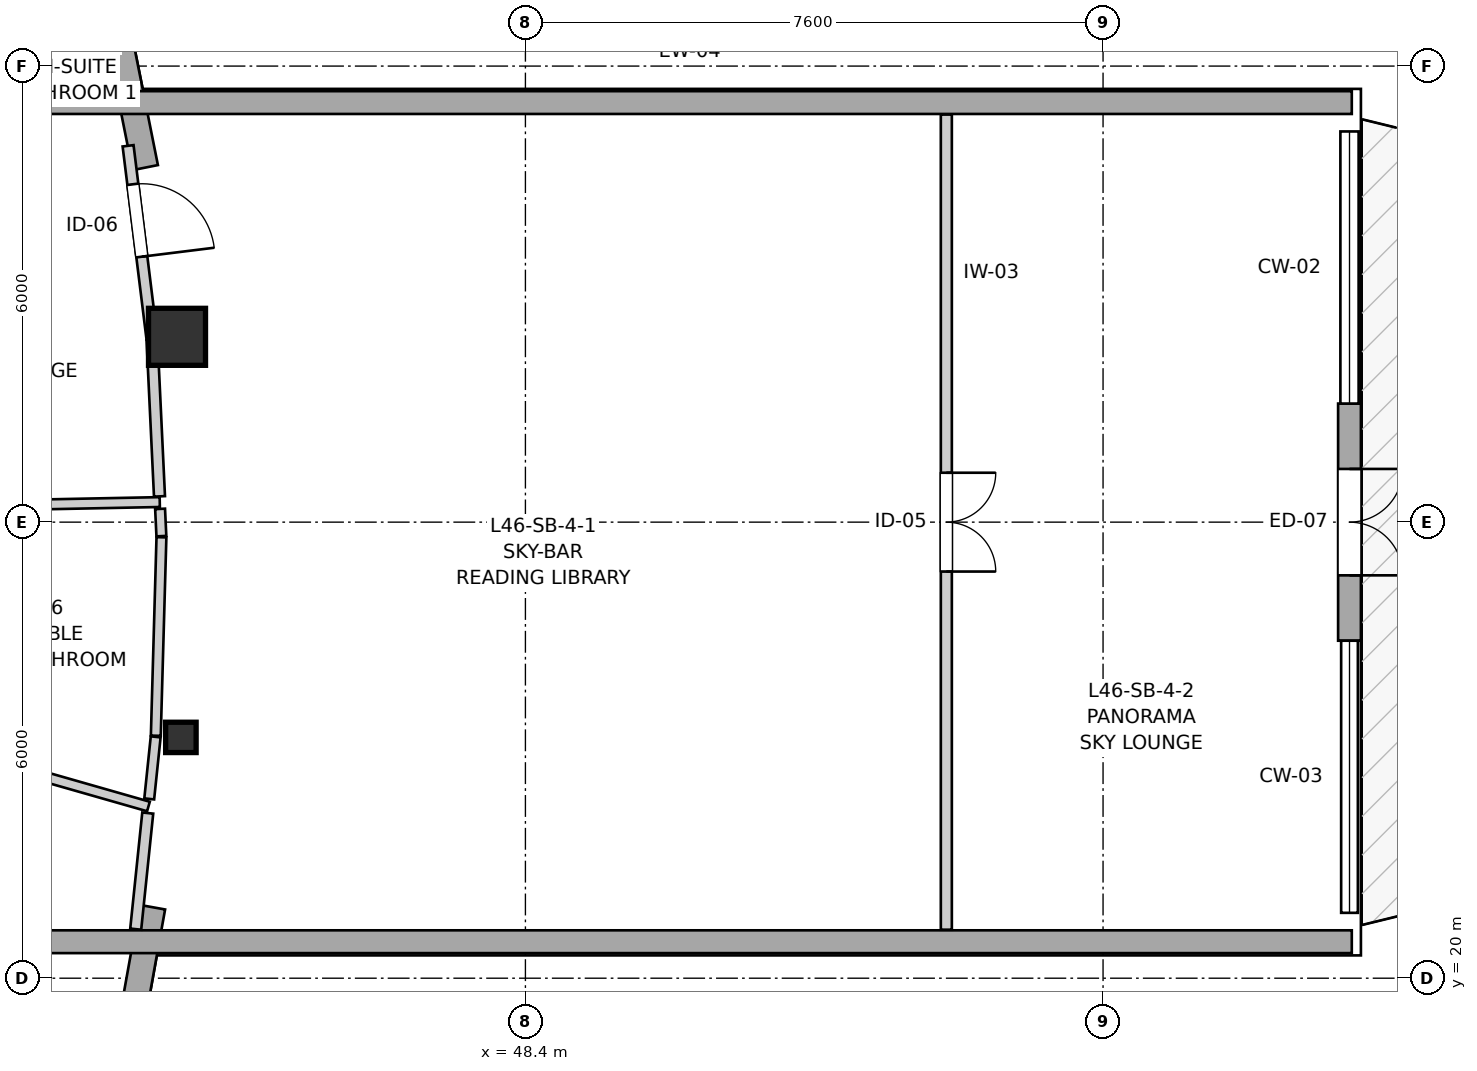
"""IFC4 building model, lengths in metres.
Left out: names, types, materials, properties, quantities, classifications, styles, units other than length and angle.
Written with IfcOpenShell. Run it as: python <this file> out.ifc"""

import sys

from ifc_helpers import new_model, si_unit, direction, frame, frame_2d, origin, origin_2d, place, context, subcontext, project, spatial, rectangle, i_section, extrude, source, transform, mapped, element, fill, save


model = new_model("IFC4")
c1 = context("Model", 3, precision=1e-05, world=origin(), true_north=direction((0.0, 1.0)))
c2 = subcontext(c1, "Body", "Model", "MODEL_VIEW")
j1 = project(units=[si_unit("LENGTHUNIT", "METRE"), si_unit("PLANEANGLEUNIT", "RADIAN")], contexts=[c1])
p1 = place(None, origin())
s1 = spatial("IfcSite", under=j1, at=p1, CompositionType="ELEMENT")
p2 = place(p1, origin())
s2 = spatial("IfcBuilding", under=s1, at=p2, CompositionType="ELEMENT")
p3 = place(p2, frame((0.0, 0.0, 155.4)))
s3 = spatial("IfcBuildingStorey", under=s2, at=p3, CompositionType="ELEMENT", Elevation=155.4)
m1 = source(origin(), c2, "Body", "SweptSolid", [
    extrude(i_section(OverallWidth=0.401, OverallDepth=0.399, WebThickness=0.023, FlangeThickness=0.036, FilletRadius=0.015, at=origin_2d()), origin(), (0.0, 0.0, 1.0), 2.935),
])
p4 = place(p3, frame((43.867, 23.168, 0.0), z_axis=(0.0, 0.0, 1.0), x_axis=(1.0, 0.0, 0.0)))
e1 = element("IfcColumn", 1, at=p4, inside=s3, PredefinedType="PILASTER", context=c2, shape_type="MappedRepresentation", body=[
    mapped(m1, transform((0.0, 0.0, 0.0), x_axis=(1.0, 0.0, 0.0), y_axis=(0.0, 1.0, 0.0), z_axis=(0.0, 0.0, 1.0), scale=1.0)),
])
m2 = source(origin(), c2, "Body", "SweptSolid", [
    extrude(rectangle(XDim=0.75, YDim=0.75, at=origin_2d()), origin(), (0.0, 0.0, 1.0), 2.935),
])
p5 = place(p3, frame((43.816, 28.438, 0.0), z_axis=(0.0, 0.0, 1.0), x_axis=(1.0, 0.0, 0.0)))
e2 = element("IfcColumn", 2, at=p5, inside=s3, PredefinedType="COLUMN", context=c2, shape_type="MappedRepresentation", body=[
    mapped(m2, transform((0.0, 0.0, 0.0), x_axis=(1.0, 0.0, 0.0), y_axis=(0.0, 1.0, 0.0), z_axis=(0.0, 0.0, 1.0), scale=1.0)),
])
p6 = place(p3, frame((42.977, 18.073, 0.0), z_axis=(0.0, 0.0, 1.0), x_axis=(0.177185533742, 0.984177467042, 0.0)))
e3 = element("IfcWall", 3, at=p6, inside=s3, PredefinedType="SOLIDWALL", context=c2, shape_type="SweptSolid", body=[
    extrude(rectangle(XDim=2.907, YDim=0.34, at=frame_2d((1.454, 0.0))), origin(), (0.0, 0.0, 1.0), 2.515),
])
p7 = place(p3, frame((43.398, 30.664, 0.0), z_axis=(0.0, 0.0, 1.0), x_axis=(-0.196147002944, 0.980574501624, 0.0)))
e4 = element("IfcWall", 4, at=p7, inside=s3, PredefinedType="SOLIDWALL", context=c2, shape_type="SweptSolid", body=[
    extrude(rectangle(XDim=3.042, YDim=0.34, at=frame_2d((1.521, 0.0))), origin(), (0.0, 0.0, 1.0), 2.515),
])
p8 = place(p7, frame((2.149, 0.0, 0.82)))
e5 = element("IfcOpeningElement", 5, at=p8, cuts=e4, PredefinedType="OPENING", context=c2, shape_type="SweptSolid", body=[
    extrude(rectangle(XDim=0.58, YDim=1.35, at=frame_2d((0.29, 0.675))), frame((0.0, 0.18, 0.0), z_axis=(0.0, -1.0, 0.0), x_axis=(1.0, 0.0, 0.0)), (0.0, 0.0, 1.0), 0.36),
])
for number, where, z_axis, x_axis in (
    (6, (41.85, 31.52, 0.0), (0.0, 0.0, 1.0), (1.0, 0.0, 0.0)),
    (7, (41.85, 20.48, 0.0), (0.0, 0.0, 1.0), (1.0, 0.0, 0.0)),
):
    element("IfcWall", number, at=place(p3, frame(where, z_axis=z_axis, x_axis=x_axis)), inside=s3, PredefinedType="SOLIDWALL", context=c2, shape_type="SweptSolid", body=[
        extrude(rectangle(XDim=17.423, YDim=0.3, at=frame_2d((8.711, 0.0))), origin(), (0.0, 0.0, 1.0), 2.115),
    ])
p9 = place(p3, frame((59.243, 27.56, 0.0), z_axis=(0.0, 0.0, 1.0), x_axis=(0.0, -1.0, 0.0)))
e8 = element("IfcWall", 8, at=p9, inside=s3, PredefinedType="SOLIDWALL", context=c2, shape_type="SweptSolid", body=[
    extrude(rectangle(XDim=3.12, YDim=0.3, at=frame_2d((1.56, 0.0))), origin(), (0.0, 0.0, 1.0), 2.3),
])
p10 = place(p9, frame((0.86, 0.0, 0.0)))
e9 = element("IfcOpeningElement", 9, at=p10, cuts=e8, PredefinedType="OPENING", context=c2, shape_type="SweptSolid", body=[
    extrude(rectangle(XDim=1.4, YDim=2.15, at=frame_2d((0.7, 1.075))), frame((0.0, 0.16, 0.0), z_axis=(0.0, -1.0, 0.0), x_axis=(1.0, 0.0, 0.0)), (0.0, 0.0, 1.0), 0.32),
])
p11 = place(p3, frame((53.938, 31.362, 0.0), z_axis=(0.0, 0.0, 1.0), x_axis=(0.0, -1.0, 0.0)))
e10 = element("IfcWall", 10, at=p11, inside=s3, PredefinedType="PARTITIONING", context=c2, shape_type="SweptSolid", body=[
    extrude(rectangle(XDim=10.724, YDim=0.145, at=frame_2d((5.362, 0.0))), origin(), (0.0, 0.0, 1.0), 2.935),
])
p12 = place(p11, frame((4.712, 0.0, 0.0)))
e11 = element("IfcOpeningElement", 11, at=p12, cuts=e10, PredefinedType="OPENING", context=c2, shape_type="SweptSolid", body=[
    extrude(rectangle(XDim=1.3, YDim=2.1, at=frame_2d((0.65, 1.05))), frame((0.0, 0.083, 0.0), z_axis=(0.0, -1.0, 0.0), x_axis=(1.0, 0.0, 0.0)), (0.0, 0.0, 1.0), 0.165),
])
p13 = place(p3, frame((43.172, 30.951, 0.0), z_axis=(0.0, 0.0, 1.0), x_axis=(0.122990311665, -0.99240787141, 0.0)))
e12 = element("IfcWall", 12, at=p13, inside=s3, PredefinedType="PARTITIONING", context=c2, shape_type="SweptSolid", body=[
    extrude(rectangle(XDim=2.561, YDim=0.145, at=frame_2d((1.28, 0.0))), origin(), (0.0, 0.0, 1.0), 2.503),
])
p14 = place(p13, frame((0.51, 0.0, 0.0)))
e13 = element("IfcOpeningElement", 13, at=p14, cuts=e12, PredefinedType="OPENING", context=c2, shape_type="SweptSolid", body=[
    extrude(rectangle(XDim=0.96, YDim=2.1, at=frame_2d((0.48, 1.05))), frame((0.0, 0.083, 0.0), z_axis=(0.0, -1.0, 0.0), x_axis=(1.0, 0.0, 0.0)), (0.0, 0.0, 1.0), 0.165),
])
p15 = place(p3, frame((38.436, 23.689, 0.0), z_axis=(0.0, 0.0, 1.0), x_axis=(0.961531027854, -0.274696345942, 0.0)))
e14 = element("IfcWall", 14, at=p15, inside=s3, PredefinedType="PARTITIONING", context=c2, shape_type="SweptSolid", body=[
    extrude(rectangle(XDim=5.205, YDim=0.13, at=frame_2d((2.602, 0.0))), origin(), (0.0, 0.0, 1.0), 2.935),
])
p16 = place(p3, frame((38.419, 26.161, 0.0), z_axis=(0.0, 0.0, 1.0), x_axis=(0.999801492135, 0.019924264719, 0.0)))
e15 = element("IfcWall", 15, at=p16, inside=s3, PredefinedType="PARTITIONING", context=c2, shape_type="SweptSolid", body=[
    extrude(rectangle(XDim=5.171, YDim=0.13, at=frame_2d((2.585, 0.0))), origin(), (0.0, 0.0, 1.0), 2.935),
])
p17 = place(p3, frame((43.537, 23.19, 0.0), z_axis=(0.0, 0.0, 1.0), x_axis=(0.028319632762, 0.999598918767, 0.0)))
e16 = element("IfcWall", 16, at=p17, inside=s3, PredefinedType="PARTITIONING", context=c2, shape_type="SweptSolid", body=[
    extrude(rectangle(XDim=2.612, YDim=0.13, at=frame_2d((1.306, 0.0))), origin(), (0.0, 0.0, 1.0), 2.503),
])
p18 = place(p3, frame((43.488, 28.395, 0.0), z_axis=(0.0, 0.0, 1.0), x_axis=(0.047441179451, -0.998874033346, 0.0)))
e17 = element("IfcWall", 17, at=p18, inside=s3, PredefinedType="PARTITIONING", context=c2, shape_type="SweptSolid", body=[
    extrude(rectangle(XDim=2.058, YDim=0.145, at=frame_2d((1.029, 0.0))), origin(), (0.0, 0.0, 1.0), 2.503),
])
p19 = place(p3, frame((43.273, 20.646, 0.0), z_axis=(0.0, 0.0, 1.0), x_axis=(0.103045636414, 0.99467662927, 0.0)))
e18 = element("IfcWall", 18, at=p19, inside=s3, PredefinedType="PARTITIONING", context=c2, shape_type="SweptSolid", body=[
    extrude(rectangle(XDim=1.535, YDim=0.145, at=frame_2d((0.768, 0.0))), origin(), (0.0, 0.0, 1.0), 2.503),
])
p20 = place(p3, frame((41.778, 31.926, 0.0), z_axis=(0.0, 0.0, 1.0), x_axis=(0.887683122967, 0.460454854681, 0.0)))
e19 = element("IfcWall", 19, at=p20, inside=s3, PredefinedType="PARTITIONING", context=c2, shape_type="SweptSolid", body=[
    extrude(rectangle(XDim=1.19, YDim=0.145, at=frame_2d((0.595, 0.0))), origin(), (0.0, 0.0, 1.0), 2.935),
])
p21 = place(p3, frame((43.45, 22.359, 0.0), z_axis=(0.0, 0.0, 1.0), x_axis=(0.103538633142, 0.994625432737, 0.0)))
e20 = element("IfcWall", 20, at=p21, inside=s3, PredefinedType="PARTITIONING", context=c2, shape_type="SweptSolid", body=[
    extrude(rectangle(XDim=0.821, YDim=0.13, at=frame_2d((0.41, 0.0))), origin(), (0.0, 0.0, 1.0), 2.503),
])
p22 = place(p3, frame((43.593, 26.174, 0.0), z_axis=(0.0, 0.0, 1.0), x_axis=(0.04762980516, -0.998865056782, 0.0)))
e21 = element("IfcWall", 21, at=p22, inside=s3, PredefinedType="PARTITIONING", context=c2, shape_type="SweptSolid", body=[
    extrude(rectangle(XDim=0.359, YDim=0.13, at=frame_2d((0.179, 0.0))), origin(), (0.0, 0.0, 1.0), 2.503),
])
m3 = source(origin(), c2, "Body", "SweptSolid", [
    extrude(rectangle(XDim=1.4, YDim=2.15, at=frame_2d((0.7, 1.075))), frame((0.0, 0.025, 0.0), z_axis=(0.0, -1.0, 0.0), x_axis=(1.0, 0.0, 0.0)), (0.0, 0.0, 1.0), 0.05),
])
p23 = place(p10, origin())
e22 = element("IfcDoor", 22, at=p23, inside=s3, OperationType="DOUBLE_DOOR_SINGLE_SWING", PredefinedType="DOOR", context=c2, shape_type="MappedRepresentation", body=[
    mapped(m3, transform((0.0, 0.0, 0.0), x_axis=(1.0, 0.0, 0.0), y_axis=(0.0, 1.0, 0.0), z_axis=(0.0, 0.0, 1.0), scale=1.0)),
])
fill(e9, e22)
m4 = source(origin(), c2, "Body", "SweptSolid", [
    extrude(rectangle(XDim=1.3, YDim=2.1, at=frame_2d((0.65, 1.05))), frame((0.0, 0.025, 0.0), z_axis=(0.0, -1.0, 0.0), x_axis=(1.0, 0.0, 0.0)), (0.0, 0.0, 1.0), 0.05),
])
p24 = place(p12, origin())
e23 = element("IfcDoor", 23, at=p24, inside=s3, OperationType="DOUBLE_DOOR_SINGLE_SWING", PredefinedType="DOOR", context=c2, shape_type="MappedRepresentation", body=[
    mapped(m4, transform((0.0, 0.0, 0.0), x_axis=(1.0, 0.0, 0.0), y_axis=(0.0, 1.0, 0.0), z_axis=(0.0, 0.0, 1.0), scale=1.0)),
])
fill(e11, e23)
m5 = source(origin(), c2, "Body", "SweptSolid", [
    extrude(rectangle(XDim=0.96, YDim=2.1, at=frame_2d((0.48, 1.05))), frame((0.0, 0.025, 0.0), z_axis=(0.0, -1.0, 0.0), x_axis=(1.0, 0.0, 0.0)), (0.0, 0.0, 1.0), 0.05),
])
p25 = place(p14, origin())
e24 = element("IfcDoor", 24, at=p25, inside=s3, OperationType="SINGLE_SWING_RIGHT", PredefinedType="DOOR", context=c2, shape_type="MappedRepresentation", body=[
    mapped(m5, transform((0.0, 0.0, 0.0), x_axis=(1.0, 0.0, 0.0), y_axis=(0.0, 1.0, 0.0), z_axis=(0.0, 0.0, 1.0), scale=1.0)),
])
fill(e13, e24)
save(model, sys.argv[1])
